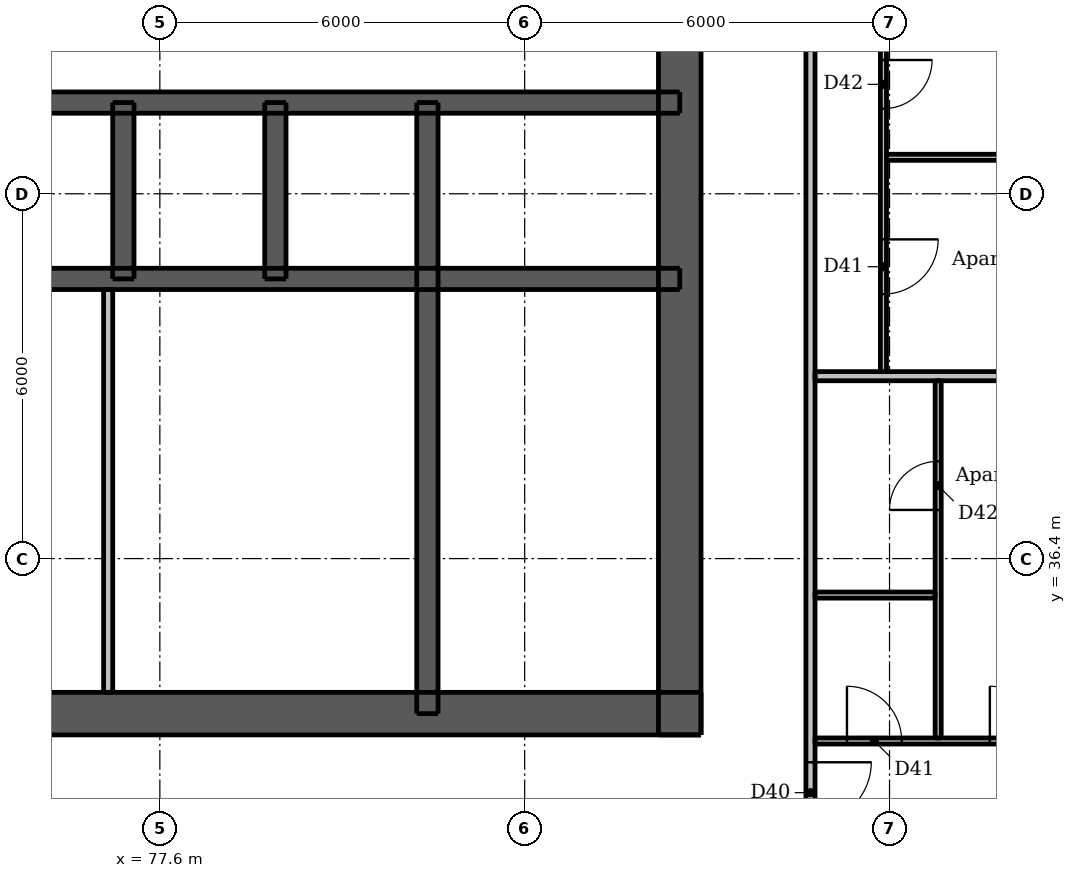
"""IFC4 building model, lengths in metres.
Left out: names, types, materials, properties, quantities, classifications, styles, units other than length and angle.
Written with IfcOpenShell. Run it as: python <this file> out.ifc"""

import sys

from ifc_helpers import new_model, si_unit, direction, frame, frame_2d, origin, place, context, subcontext, project, spatial, rectangle, extrude, element, fill, save


model = new_model("IFC4")
c1 = context("Model", 3, precision=1e-05, world=origin(), true_north=direction((0.0, 1.0)))
c2 = subcontext(c1, "Body", "Model", "MODEL_VIEW")
j1 = project(units=[si_unit("LENGTHUNIT", "METRE"), si_unit("PLANEANGLEUNIT", "RADIAN")], contexts=[c1])
p1 = place(None, origin())
s1 = spatial("IfcSite", under=j1, at=p1, CompositionType="ELEMENT")
p2 = place(p1, origin())
s2 = spatial("IfcBuilding", under=s1, at=p2, CompositionType="ELEMENT")
p3 = place(p2, frame((0.0, 0.0, 143.8)))
s3 = spatial("IfcBuildingStorey", under=s2, at=p3, CompositionType="ELEMENT", Elevation=143.8)
p4 = place(p3, frame((62.5, 33.85, 0.0), z_axis=(0.0, 0.0, 1.0), x_axis=(1.0, 0.0, 0.0)))
e1 = element("IfcWall", 1, at=p4, inside=s3, PredefinedType="SHEAR", context=c2, shape_type="SweptSolid", body=[
    extrude(rectangle(XDim=24.0, YDim=0.7, at=frame_2d((12.0, 0.0))), origin(), (0.0, 0.0, 1.0), 3.05),
])
p5 = place(p4, frame((1.962, 0.0, 0.0)))
e2 = element("IfcOpeningElement", 2, at=p5, cuts=e1, PredefinedType="OPENING", context=c2, shape_type="SweptSolid", body=[
    extrude(rectangle(XDim=1.1, YDim=2.1, at=frame_2d((0.55, 1.05))), frame((0.0, 0.36, 0.0), z_axis=(0.0, -1.0, 0.0), x_axis=(1.0, 0.0, 0.0)), (0.0, 0.0, 1.0), 0.72),
])
p6 = place(p4, frame((20.938, 0.0, 0.0)))
e3 = element("IfcOpeningElement", 3, at=p6, cuts=e1, PredefinedType="OPENING", context=c2, shape_type="SweptSolid", body=[
    extrude(rectangle(XDim=1.1, YDim=2.1, at=frame_2d((0.55, 1.05))), frame((0.0, 0.36, 0.0), z_axis=(0.0, -1.0, 0.0), x_axis=(1.0, 0.0, 0.0)), (0.0, 0.0, 1.0), 0.72),
])
p7 = place(p4, frame((8.0, 0.0, 0.0)))
e4 = element("IfcOpeningElement", 4, at=p7, cuts=e1, PredefinedType="OPENING", context=c2, shape_type="SweptSolid", body=[
    extrude(rectangle(XDim=1.1, YDim=2.1, at=frame_2d((0.55, 1.05))), frame((0.0, 0.36, 0.0), z_axis=(0.0, -1.0, 0.0), x_axis=(1.0, 0.0, 0.0)), (0.0, 0.0, 1.0), 0.72),
])
p8 = place(p4, frame((16.375, 0.0, 0.0)))
e5 = element("IfcOpeningElement", 5, at=p8, cuts=e1, PredefinedType="OPENING", context=c2, shape_type="SweptSolid", body=[
    extrude(rectangle(XDim=0.9, YDim=2.1, at=frame_2d((0.45, 1.05))), frame((0.0, 0.36, 0.0), z_axis=(0.0, -1.0, 0.0), x_axis=(1.0, 0.0, 0.0)), (0.0, 0.0, 1.0), 0.72),
])
p9 = place(p3, frame((86.15, 33.5, 0.0), z_axis=(0.0, 0.0, 1.0), x_axis=(0.0, 1.0, 0.0)))
e6 = element("IfcWall", 6, at=p9, inside=s3, PredefinedType="SHEAR", context=c2, shape_type="SweptSolid", body=[
    extrude(rectangle(XDim=24.0, YDim=0.7, at=frame_2d((12.0, 0.0))), origin(), (0.0, 0.0, 1.0), 3.05),
])
p10 = place(p9, frame((11.2, 0.0, 0.0)))
e7 = element("IfcOpeningElement", 7, at=p10, cuts=e6, PredefinedType="OPENING", context=c2, shape_type="SweptSolid", body=[
    extrude(rectangle(XDim=1.6, YDim=2.1, at=frame_2d((0.8, 1.05))), frame((0.0, 0.36, 0.0), z_axis=(0.0, -1.0, 0.0), x_axis=(1.0, 0.0, 0.0)), (0.0, 0.0, 1.0), 0.72),
])
p11 = place(p3, frame((62.85, 41.0, 0.0), z_axis=(0.0, 0.0, 1.0), x_axis=(1.0, 0.0, 0.0)))
e8 = element("IfcWall", 8, at=p11, inside=s3, PredefinedType="SHEAR", context=c2, shape_type="SweptSolid", body=[
    extrude(rectangle(XDim=23.3, YDim=0.35, at=frame_2d((11.65, 0.0))), origin(), (0.0, 0.0, 1.0), 3.05),
])
p12 = place(p3, frame((62.85, 43.9, 0.0), z_axis=(0.0, 0.0, 1.0), x_axis=(1.0, 0.0, 0.0)))
e9 = element("IfcWall", 9, at=p12, inside=s3, PredefinedType="SHEAR", context=c2, shape_type="SweptSolid", body=[
    extrude(rectangle(XDim=23.3, YDim=0.35, at=frame_2d((11.65, 0.0))), origin(), (0.0, 0.0, 1.0), 3.05),
])
p13 = place(p12, frame((1.712, 0.0, 0.0)))
e10 = element("IfcOpeningElement", 10, at=p13, cuts=e9, PredefinedType="OPENING", context=c2, shape_type="SweptSolid", body=[
    extrude(rectangle(XDim=0.9, YDim=2.1, at=frame_2d((0.45, 1.05))), frame((0.0, 0.185, 0.0), z_axis=(0.0, -1.0, 0.0), x_axis=(1.0, 0.0, 0.0)), (0.0, 0.0, 1.0), 0.37),
])
p14 = place(p12, frame((20.688, 0.0, 0.0)))
e11 = element("IfcOpeningElement", 11, at=p14, cuts=e9, PredefinedType="OPENING", context=c2, shape_type="SweptSolid", body=[
    extrude(rectangle(XDim=0.9, YDim=2.1, at=frame_2d((0.45, 1.05))), frame((0.0, 0.185, 0.0), z_axis=(0.0, -1.0, 0.0), x_axis=(1.0, 0.0, 0.0)), (0.0, 0.0, 1.0), 0.37),
])
p15 = place(p12, frame((4.85, 0.0, 0.0)))
e12 = element("IfcOpeningElement", 12, at=p15, cuts=e9, PredefinedType="OPENING", context=c2, shape_type="SweptSolid", body=[
    extrude(rectangle(XDim=1.1, YDim=2.1, at=frame_2d((0.55, 1.05))), frame((0.0, 0.185, 0.0), z_axis=(0.0, -1.0, 0.0), x_axis=(1.0, 0.0, 0.0)), (0.0, 0.0, 1.0), 0.37),
])
p16 = place(p12, frame((7.35, 0.0, 0.0)))
e13 = element("IfcOpeningElement", 13, at=p16, cuts=e9, PredefinedType="OPENING", context=c2, shape_type="SweptSolid", body=[
    extrude(rectangle(XDim=1.1, YDim=2.1, at=frame_2d((0.55, 1.05))), frame((0.0, 0.185, 0.0), z_axis=(0.0, -1.0, 0.0), x_axis=(1.0, 0.0, 0.0)), (0.0, 0.0, 1.0), 0.37),
])
p17 = place(p12, frame((9.85, 0.0, 0.0)))
e14 = element("IfcOpeningElement", 14, at=p17, cuts=e9, PredefinedType="OPENING", context=c2, shape_type="SweptSolid", body=[
    extrude(rectangle(XDim=1.1, YDim=2.1, at=frame_2d((0.55, 1.05))), frame((0.0, 0.185, 0.0), z_axis=(0.0, -1.0, 0.0), x_axis=(1.0, 0.0, 0.0)), (0.0, 0.0, 1.0), 0.37),
])
p18 = place(p12, frame((12.35, 0.0, 0.0)))
e15 = element("IfcOpeningElement", 15, at=p18, cuts=e9, PredefinedType="OPENING", context=c2, shape_type="SweptSolid", body=[
    extrude(rectangle(XDim=1.1, YDim=2.1, at=frame_2d((0.55, 1.05))), frame((0.0, 0.185, 0.0), z_axis=(0.0, -1.0, 0.0), x_axis=(1.0, 0.0, 0.0)), (0.0, 0.0, 1.0), 0.37),
])
p19 = place(p12, frame((14.85, 0.0, 0.0)))
e16 = element("IfcOpeningElement", 16, at=p19, cuts=e9, PredefinedType="OPENING", context=c2, shape_type="SweptSolid", body=[
    extrude(rectangle(XDim=1.1, YDim=2.1, at=frame_2d((0.55, 1.05))), frame((0.0, 0.185, 0.0), z_axis=(0.0, -1.0, 0.0), x_axis=(1.0, 0.0, 0.0)), (0.0, 0.0, 1.0), 0.37),
])
p20 = place(p12, frame((17.35, 0.0, 0.0)))
e17 = element("IfcOpeningElement", 17, at=p20, cuts=e9, PredefinedType="OPENING", context=c2, shape_type="SweptSolid", body=[
    extrude(rectangle(XDim=1.1, YDim=2.1, at=frame_2d((0.55, 1.05))), frame((0.0, 0.185, 0.0), z_axis=(0.0, -1.0, 0.0), x_axis=(1.0, 0.0, 0.0)), (0.0, 0.0, 1.0), 0.37),
])
p21 = place(p3, frame((82.0, 33.85, 0.0), z_axis=(0.0, 0.0, 1.0), x_axis=(0.0, 1.0, 0.0)))
e18 = element("IfcWall", 18, at=p21, inside=s3, PredefinedType="SHEAR", context=c2, shape_type="SweptSolid", body=[
    extrude(rectangle(XDim=10.05, YDim=0.35, at=frame_2d((5.025, 0.0))), origin(), (0.0, 0.0, 1.0), 3.05),
])
for number, where, z_axis, x_axis in (
    (19, (77.0, 41.0, 0.0), (0.0, 0.0, 1.0), (0.0, 1.0, 0.0)),
    (20, (79.5, 41.0, 0.0), (0.0, 0.0, 1.0), (0.0, 1.0, 0.0)),
):
    element("IfcWall", number, at=place(p3, frame(where, z_axis=z_axis, x_axis=x_axis)), inside=s3, PredefinedType="SHEAR", context=c2, shape_type="SweptSolid", body=[
        extrude(rectangle(XDim=2.9, YDim=0.35, at=frame_2d((1.45, 0.0))), origin(), (0.0, 0.0, 1.0), 3.05),
    ])
p22 = place(p3, frame((76.75, 34.2, 0.0), z_axis=(0.0, 0.0, 1.0), x_axis=(0.0, 1.0, 0.0)))
e21 = element("IfcWall", 21, at=p22, inside=s3, PredefinedType="PLUMBINGWALL", context=c2, shape_type="SweptSolid", body=[
    extrude(rectangle(XDim=6.625, YDim=0.15, at=frame_2d((3.312, 0.0))), origin(), (0.0, 0.0, 1.0), 3.05),
])
p23 = place(p3, frame((89.5, 54.325, 0.0), z_axis=(0.0, 0.0, 1.0), x_axis=(0.0, -1.0, 0.0)))
e22 = element("IfcWall", 22, at=p23, inside=s3, PredefinedType="PARTITIONING", context=c2, shape_type="SweptSolid", body=[
    extrude(rectangle(XDim=14.85, YDim=0.1, at=frame_2d((7.425, 0.0))), origin(), (0.0, 0.0, 1.0), 3.05),
])
p24 = place(p23, frame((5.475, 0.0, 0.0)))
e23 = element("IfcOpeningElement", 23, at=p24, cuts=e22, PredefinedType="OPENING", context=c2, shape_type="SweptSolid", body=[
    extrude(rectangle(XDim=0.9, YDim=2.1, at=frame_2d((0.45, 1.05))), frame((0.0, 0.06, 0.0), z_axis=(0.0, -1.0, 0.0), x_axis=(1.0, 0.0, 0.0)), (0.0, 0.0, 1.0), 0.12),
])
p25 = place(p23, frame((0.975, 0.0, 0.0)))
e24 = element("IfcOpeningElement", 24, at=p25, cuts=e22, PredefinedType="OPENING", context=c2, shape_type="SweptSolid", body=[
    extrude(rectangle(XDim=0.9, YDim=2.1, at=frame_2d((0.45, 1.05))), frame((0.0, 0.06, 0.0), z_axis=(0.0, -1.0, 0.0), x_axis=(1.0, 0.0, 0.0)), (0.0, 0.0, 1.0), 0.12),
])
p26 = place(p23, frame((12.675, 0.0, 0.0)))
e25 = element("IfcOpeningElement", 25, at=p26, cuts=e22, PredefinedType="OPENING", context=c2, shape_type="SweptSolid", body=[
    extrude(rectangle(XDim=0.9, YDim=2.1, at=frame_2d((0.45, 1.05))), frame((0.0, 0.06, 0.0), z_axis=(0.0, -1.0, 0.0), x_axis=(1.0, 0.0, 0.0)), (0.0, 0.0, 1.0), 0.12),
])
p27 = place(p23, frame((9.725, 0.0, 0.0)))
e26 = element("IfcOpeningElement", 26, at=p27, cuts=e22, PredefinedType="OPENING", context=c2, shape_type="SweptSolid", body=[
    extrude(rectangle(XDim=0.8, YDim=2.1, at=frame_2d((0.4, 1.05))), frame((0.0, 0.06, 0.0), z_axis=(0.0, -1.0, 0.0), x_axis=(1.0, 0.0, 0.0)), (0.0, 0.0, 1.0), 0.12),
])
p28 = place(p3, frame((90.4, 33.45, 0.0), z_axis=(0.0, 0.0, 1.0), x_axis=(0.0, 1.0, 0.0)))
e27 = element("IfcWall", 27, at=p28, inside=s3, PredefinedType="PARTITIONING", context=c2, shape_type="SweptSolid", body=[
    extrude(rectangle(XDim=5.875, YDim=0.1, at=frame_2d((2.938, 0.0))), origin(), (0.0, 0.0, 1.0), 3.05),
])
p29 = place(p28, frame((3.75, 0.0, 0.0)))
e28 = element("IfcOpeningElement", 28, at=p29, cuts=e27, PredefinedType="OPENING", context=c2, shape_type="SweptSolid", body=[
    extrude(rectangle(XDim=0.8, YDim=2.1, at=frame_2d((0.4, 1.05))), frame((0.0, 0.06, 0.0), z_axis=(0.0, -1.0, 0.0), x_axis=(1.0, 0.0, 0.0)), (0.0, 0.0, 1.0), 0.12),
])
p30 = place(p3, frame((89.55, 43.0, 0.0), z_axis=(0.0, 0.0, 1.0), x_axis=(1.0, 0.0, 0.0)))
e29 = element("IfcWall", 29, at=p30, inside=s3, PredefinedType="PARTITIONING", context=c2, shape_type="SweptSolid", body=[
    extrude(rectangle(XDim=2.3, YDim=0.1, at=frame_2d((1.15, 0.0))), origin(), (0.0, 0.0, 1.0), 3.05),
])
p31 = place(p3, frame((88.375, 35.8, 0.0), z_axis=(0.0, 0.0, 1.0), x_axis=(1.0, 0.0, 0.0)))
e30 = element("IfcWall", 30, at=p31, inside=s3, PredefinedType="PARTITIONING", context=c2, shape_type="SweptSolid", body=[
    extrude(rectangle(XDim=1.975, YDim=0.1, at=frame_2d((0.988, 0.0))), origin(), (0.0, 0.0, 1.0), 3.05),
])
p32 = place(p3, frame((88.375, 33.4, 0.0), z_axis=(0.0, 0.0, 1.0), x_axis=(1.0, 0.0, 0.0)))
e31 = element("IfcWall", 31, at=p32, inside=s3, PredefinedType="PARTITIONING", context=c2, shape_type="SweptSolid", body=[
    extrude(rectangle(XDim=4.625, YDim=0.1, at=frame_2d((2.312, 0.0))), origin(), (0.0, 0.0, 1.0), 3.05),
])
p33 = place(p32, frame((0.525, 0.0, 0.0)))
e32 = element("IfcOpeningElement", 32, at=p33, cuts=e31, PredefinedType="OPENING", context=c2, shape_type="SweptSolid", body=[
    extrude(rectangle(XDim=0.9, YDim=2.1, at=frame_2d((0.45, 1.05))), frame((0.0, 0.06, 0.0), z_axis=(0.0, -1.0, 0.0), x_axis=(1.0, 0.0, 0.0)), (0.0, 0.0, 1.0), 0.12),
])
p34 = place(p32, frame((2.875, 0.0, 0.0)))
e33 = element("IfcOpeningElement", 33, at=p34, cuts=e31, PredefinedType="OPENING", context=c2, shape_type="SweptSolid", body=[
    extrude(rectangle(XDim=0.9, YDim=2.1, at=frame_2d((0.45, 1.05))), frame((0.0, 0.06, 0.0), z_axis=(0.0, -1.0, 0.0), x_axis=(1.0, 0.0, 0.0)), (0.0, 0.0, 1.0), 0.12),
])
p35 = place(p3, frame((88.3, 60.475, 0.0), z_axis=(0.0, 0.0, 1.0), x_axis=(0.0, -1.0, 0.0)))
e34 = element("IfcWall", 34, at=p35, inside=s3, PredefinedType="PARTITIONING", context=c2, shape_type="SweptSolid", body=[
    extrude(rectangle(XDim=28.7, YDim=0.15, at=frame_2d((14.35, 0.0))), origin(), (0.0, 0.0, 1.0), 3.05),
])
p36 = place(p35, frame((27.425, 0.0, 0.0)))
e35 = element("IfcOpeningElement", 35, at=p36, cuts=e34, PredefinedType="OPENING", context=c2, shape_type="SweptSolid", body=[
    extrude(rectangle(XDim=1.0, YDim=2.1, at=frame_2d((0.5, 1.05))), frame((0.0, 0.085, 0.0), z_axis=(0.0, -1.0, 0.0), x_axis=(1.0, 0.0, 0.0)), (0.0, 0.0, 1.0), 0.17),
])
p37 = place(p35, frame((13.075, 0.0, 0.0)))
e36 = element("IfcOpeningElement", 36, at=p37, cuts=e34, PredefinedType="OPENING", context=c2, shape_type="SweptSolid", body=[
    extrude(rectangle(XDim=1.0, YDim=2.1, at=frame_2d((0.5, 1.05))), frame((0.0, 0.085, 0.0), z_axis=(0.0, -1.0, 0.0), x_axis=(1.0, 0.0, 0.0)), (0.0, 0.0, 1.0), 0.17),
])
p38 = place(p35, frame((2.575, 0.0, 0.0)))
e37 = element("IfcOpeningElement", 37, at=p38, cuts=e34, PredefinedType="OPENING", context=c2, shape_type="SweptSolid", body=[
    extrude(rectangle(XDim=1.0, YDim=2.1, at=frame_2d((0.5, 1.05))), frame((0.0, 0.085, 0.0), z_axis=(0.0, -1.0, 0.0), x_axis=(1.0, 0.0, 0.0)), (0.0, 0.0, 1.0), 0.17),
])
p39 = place(p3, frame((88.375, 39.4, 0.0), z_axis=(0.0, 0.0, 1.0), x_axis=(1.0, 0.0, 0.0)))
e38 = element("IfcWall", 38, at=p39, inside=s3, PredefinedType="PARTITIONING", context=c2, shape_type="SweptSolid", body=[
    extrude(rectangle(XDim=7.625, YDim=0.15, at=frame_2d((3.812, 0.0))), origin(), (0.0, 0.0, 1.0), 3.05),
])
p40 = place(p6, origin())
e39 = element("IfcDoor", 39, at=p40, inside=s3, OperationType="SINGLE_SWING_RIGHT", PredefinedType="DOOR", context=c2, shape_type="SweptSolid", body=[
    extrude(rectangle(XDim=1.1, YDim=2.1, at=frame_2d((0.55, 1.05))), frame((0.0, 0.337, 0.0), z_axis=(0.0, -1.0, 0.0), x_axis=(1.0, 0.0, 0.0)), (0.0, 0.0, 1.0), 0.05),
])
fill(e3, e39)
p41 = place(p10, origin())
e40 = element("IfcDoor", 40, at=p41, inside=s3, OperationType="DOUBLE_DOOR_SINGLE_SWING", PredefinedType="DOOR", context=c2, shape_type="SweptSolid", body=[
    extrude(rectangle(XDim=1.6, YDim=2.1, at=frame_2d((0.8, 1.05))), frame((0.0, 0.337, 0.0), z_axis=(0.0, -1.0, 0.0), x_axis=(1.0, 0.0, 0.0)), (0.0, 0.0, 1.0), 0.05),
])
fill(e7, e40)
p42 = place(p8, origin())
e41 = element("IfcDoor", 41, at=p42, inside=s3, OperationType="SINGLE_SWING_LEFT", PredefinedType="DOOR", context=c2, shape_type="SweptSolid", body=[
    extrude(rectangle(XDim=0.9, YDim=2.1, at=frame_2d((0.45, 1.05))), frame((0.0, 0.337, 0.0), z_axis=(0.0, -1.0, 0.0), x_axis=(1.0, 0.0, 0.0)), (0.0, 0.0, 1.0), 0.05),
])
fill(e5, e41)
p43 = place(p14, origin())
e42 = element("IfcDoor", 42, at=p43, inside=s3, OperationType="SINGLE_SWING_LEFT", PredefinedType="DOOR", context=c2, shape_type="SweptSolid", body=[
    extrude(rectangle(XDim=0.9, YDim=2.1, at=frame_2d((0.45, 1.05))), frame((0.0, -0.112, 0.0), z_axis=(0.0, -1.0, 0.0), x_axis=(1.0, 0.0, 0.0)), (0.0, 0.0, 1.0), 0.05),
])
fill(e11, e42)
p44 = place(p18, origin())
e43 = element("IfcDoor", 43, at=p44, inside=s3, OperationType="DOUBLE_DOOR_SLIDING", PredefinedType="DOOR", context=c2, shape_type="SweptSolid", body=[
    extrude(rectangle(XDim=1.1, YDim=2.1, at=frame_2d((0.55, 1.05))), frame((0.0, 0.025, 0.0), z_axis=(0.0, -1.0, 0.0), x_axis=(1.0, 0.0, 0.0)), (0.0, 0.0, 1.0), 0.05),
])
fill(e15, e43)
p45 = place(p19, origin())
e44 = element("IfcDoor", 44, at=p45, inside=s3, OperationType="DOUBLE_DOOR_SLIDING", PredefinedType="DOOR", context=c2, shape_type="SweptSolid", body=[
    extrude(rectangle(XDim=1.1, YDim=2.1, at=frame_2d((0.55, 1.05))), frame((0.0, 0.025, 0.0), z_axis=(0.0, -1.0, 0.0), x_axis=(1.0, 0.0, 0.0)), (0.0, 0.0, 1.0), 0.05),
])
fill(e16, e44)
p46 = place(p20, origin())
e45 = element("IfcDoor", 45, at=p46, inside=s3, OperationType="DOUBLE_DOOR_SLIDING", PredefinedType="DOOR", context=c2, shape_type="SweptSolid", body=[
    extrude(rectangle(XDim=1.1, YDim=2.1, at=frame_2d((0.55, 1.05))), frame((0.0, 0.025, 0.0), z_axis=(0.0, -1.0, 0.0), x_axis=(1.0, 0.0, 0.0)), (0.0, 0.0, 1.0), 0.05),
])
fill(e17, e45)
p47 = place(p36, origin())
e46 = element("IfcDoor", 46, at=p47, inside=s3, OperationType="SINGLE_SWING_LEFT", PredefinedType="DOOR", context=c2, shape_type="SweptSolid", body=[
    extrude(rectangle(XDim=1.0, YDim=2.1, at=frame_2d((0.5, 1.05))), frame((0.0, 0.025, 0.0), z_axis=(0.0, -1.0, 0.0), x_axis=(1.0, 0.0, 0.0)), (0.0, 0.0, 1.0), 0.05),
])
fill(e35, e46)
p48 = place(p33, origin())
e47 = element("IfcDoor", 47, at=p48, inside=s3, OperationType="SINGLE_SWING_LEFT", PredefinedType="DOOR", context=c2, shape_type="SweptSolid", body=[
    extrude(rectangle(XDim=0.9, YDim=2.1, at=frame_2d((0.45, 1.05))), frame((0.0, 0.025, 0.0), z_axis=(0.0, -1.0, 0.0), x_axis=(1.0, 0.0, 0.0)), (0.0, 0.0, 1.0), 0.05),
])
fill(e32, e47)
p49 = place(p34, origin())
e48 = element("IfcDoor", 48, at=p49, inside=s3, OperationType="SINGLE_SWING_LEFT", PredefinedType="DOOR", context=c2, shape_type="SweptSolid", body=[
    extrude(rectangle(XDim=0.9, YDim=2.1, at=frame_2d((0.45, 1.05))), frame((0.0, 0.025, 0.0), z_axis=(0.0, -1.0, 0.0), x_axis=(1.0, 0.0, 0.0)), (0.0, 0.0, 1.0), 0.05),
])
fill(e33, e48)
p50 = place(p29, origin())
e49 = element("IfcDoor", 49, at=p50, inside=s3, OperationType="SINGLE_SWING_LEFT", PredefinedType="DOOR", context=c2, shape_type="SweptSolid", body=[
    extrude(rectangle(XDim=0.8, YDim=2.1, at=frame_2d((0.4, 1.05))), frame((0.0, 0.025, 0.0), z_axis=(0.0, -1.0, 0.0), x_axis=(1.0, 0.0, 0.0)), (0.0, 0.0, 1.0), 0.05),
])
fill(e28, e49)
p51 = place(p26, origin())
e50 = element("IfcDoor", 50, at=p51, inside=s3, OperationType="SINGLE_SWING_LEFT", PredefinedType="DOOR", context=c2, shape_type="SweptSolid", body=[
    extrude(rectangle(XDim=0.9, YDim=2.1, at=frame_2d((0.45, 1.05))), frame((0.0, 0.025, 0.0), z_axis=(0.0, -1.0, 0.0), x_axis=(1.0, 0.0, 0.0)), (0.0, 0.0, 1.0), 0.05),
])
fill(e25, e50)
p52 = place(p27, origin())
e51 = element("IfcDoor", 51, at=p52, inside=s3, OperationType="SINGLE_SWING_LEFT", PredefinedType="DOOR", context=c2, shape_type="SweptSolid", body=[
    extrude(rectangle(XDim=0.8, YDim=2.1, at=frame_2d((0.4, 1.05))), frame((0.0, 0.025, 0.0), z_axis=(0.0, -1.0, 0.0), x_axis=(1.0, 0.0, 0.0)), (0.0, 0.0, 1.0), 0.05),
])
fill(e26, e51)
save(model, sys.argv[1])
